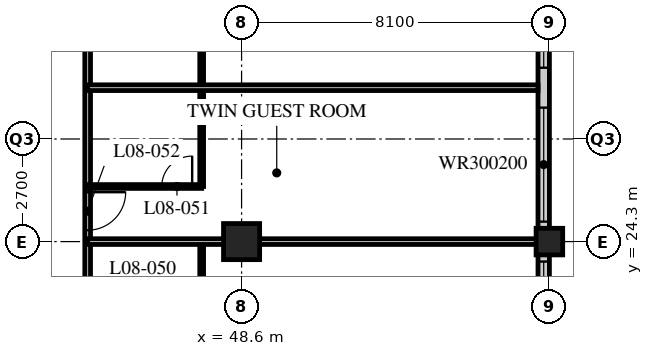
"""IFC4 building model, lengths in metres.
Left out: names, types, materials, properties, quantities, classifications, styles, units other than length and angle.
Written with IfcOpenShell. Run it as: python <this file> out.ifc"""

import sys

from ifc_helpers import new_model, si_unit, direction, frame, frame_2d, origin, origin_2d, place, context, subcontext, project, spatial, rectangle, hollow_rectangle, extrude, element, fill, save


model = new_model("IFC4")
c1 = context("Model", 3, precision=1e-05, world=origin(), true_north=direction((0.0, 1.0)))
c2 = subcontext(c1, "Body", "Model", "MODEL_VIEW")
j1 = project(units=[si_unit("LENGTHUNIT", "METRE"), si_unit("PLANEANGLEUNIT", "RADIAN")], contexts=[c1])
p1 = place(None, origin())
s1 = spatial("IfcSite", under=j1, at=p1, CompositionType="ELEMENT")
p2 = place(p1, origin())
s2 = spatial("IfcBuilding", under=s1, at=p2, CompositionType="ELEMENT")
p3 = place(p2, frame((0.0, 0.0, 39.8)))
s3 = spatial("IfcBuildingStorey", under=s2, at=p3, CompositionType="ELEMENT", Elevation=39.8)
p4 = place(p3, frame((48.6, 24.3, 0.0), z_axis=(0.0, 0.0, 1.0), x_axis=(1.0, 0.0, 0.0)))
e1 = element("IfcColumn", 1, at=p4, inside=s3, PredefinedType="COLUMN", context=c2, shape_type="SweptSolid", body=[
    extrude(hollow_rectangle(XDim=0.95, YDim=0.95, WallThickness=0.095, at=origin_2d()), origin(), (0.0, 0.0, 1.0), 3.4),
])
p5 = place(p3, frame((56.7, 24.3, 0.0), z_axis=(0.0, 0.0, 1.0), x_axis=(1.0, 0.0, 0.0)))
e2 = element("IfcColumn", 2, at=p5, inside=s3, PredefinedType="COLUMN", context=c2, shape_type="SweptSolid", body=[
    extrude(hollow_rectangle(XDim=0.7, YDim=0.7, WallThickness=0.06, at=origin_2d()), origin(), (0.0, 0.0, 1.0), 3.4),
])
p6 = place(p3, frame((56.55, 8.4, 0.0), z_axis=(0.0, 0.0, 1.0), x_axis=(0.0, 1.0, 0.0)))
e3 = element("IfcWall", 3, at=p6, inside=s3, PredefinedType="SOLIDWALL", context=c2, shape_type="SweptSolid", body=[
    extrude(rectangle(XDim=32.1, YDim=0.3, at=frame_2d((16.05, 0.0))), origin(), (0.0, 0.0, 1.0), 3.19),
])
p7 = place(p6, frame((0.225, 0.0, 0.9)))
e4 = element("IfcOpeningElement", 4, at=p7, cuts=e3, PredefinedType="OPENING", context=c2, shape_type="SweptSolid", body=[
    extrude(rectangle(XDim=3.0, YDim=2.0, at=frame_2d((1.5, 1.0))), frame((0.0, 0.16, 0.0), z_axis=(0.0, -1.0, 0.0), x_axis=(1.0, 0.0, 0.0)), (0.0, 0.0, 1.0), 0.32),
])
p8 = place(p6, frame((4.275, 0.0, 0.9)))
e5 = element("IfcOpeningElement", 5, at=p8, cuts=e3, PredefinedType="OPENING", context=c2, shape_type="SweptSolid", body=[
    extrude(rectangle(XDim=3.0, YDim=2.0, at=frame_2d((1.5, 1.0))), frame((0.0, 0.16, 0.0), z_axis=(0.0, -1.0, 0.0), x_axis=(1.0, 0.0, 0.0)), (0.0, 0.0, 1.0), 0.32),
])
p9 = place(p6, frame((8.325, 0.0, 0.9)))
e6 = element("IfcOpeningElement", 6, at=p9, cuts=e3, PredefinedType="OPENING", context=c2, shape_type="SweptSolid", body=[
    extrude(rectangle(XDim=3.0, YDim=2.0, at=frame_2d((1.5, 1.0))), frame((0.0, 0.16, 0.0), z_axis=(0.0, -1.0, 0.0), x_axis=(1.0, 0.0, 0.0)), (0.0, 0.0, 1.0), 0.32),
])
p10 = place(p6, frame((12.375, 0.0, 0.9)))
e7 = element("IfcOpeningElement", 7, at=p10, cuts=e3, PredefinedType="OPENING", context=c2, shape_type="SweptSolid", body=[
    extrude(rectangle(XDim=3.0, YDim=2.0, at=frame_2d((1.5, 1.0))), frame((0.0, 0.16, 0.0), z_axis=(0.0, -1.0, 0.0), x_axis=(1.0, 0.0, 0.0)), (0.0, 0.0, 1.0), 0.32),
])
p11 = place(p6, frame((16.425, 0.0, 0.9)))
e8 = element("IfcOpeningElement", 8, at=p11, cuts=e3, PredefinedType="OPENING", context=c2, shape_type="SweptSolid", body=[
    extrude(rectangle(XDim=3.0, YDim=2.0, at=frame_2d((1.5, 1.0))), frame((0.0, 0.16, 0.0), z_axis=(0.0, -1.0, 0.0), x_axis=(1.0, 0.0, 0.0)), (0.0, 0.0, 1.0), 0.32),
])
p12 = place(p6, frame((20.475, 0.0, 0.9)))
e9 = element("IfcOpeningElement", 9, at=p12, cuts=e3, PredefinedType="OPENING", context=c2, shape_type="SweptSolid", body=[
    extrude(rectangle(XDim=3.0, YDim=2.0, at=frame_2d((1.5, 1.0))), frame((0.0, 0.16, 0.0), z_axis=(0.0, -1.0, 0.0), x_axis=(1.0, 0.0, 0.0)), (0.0, 0.0, 1.0), 0.32),
])
p13 = place(p6, frame((24.525, 0.0, 0.9)))
e10 = element("IfcOpeningElement", 10, at=p13, cuts=e3, PredefinedType="OPENING", context=c2, shape_type="SweptSolid", body=[
    extrude(rectangle(XDim=3.0, YDim=2.0, at=frame_2d((1.5, 1.0))), frame((0.0, 0.16, 0.0), z_axis=(0.0, -1.0, 0.0), x_axis=(1.0, 0.0, 0.0)), (0.0, 0.0, 1.0), 0.32),
])
p14 = place(p6, frame((28.575, 0.0, 0.9)))
e11 = element("IfcOpeningElement", 11, at=p14, cuts=e3, PredefinedType="OPENING", context=c2, shape_type="SweptSolid", body=[
    extrude(rectangle(XDim=3.0, YDim=2.0, at=frame_2d((1.5, 1.0))), frame((0.0, 0.16, 0.0), z_axis=(0.0, -1.0, 0.0), x_axis=(1.0, 0.0, 0.0)), (0.0, 0.0, 1.0), 0.32),
])
p15 = place(p3, frame((44.55, 16.2, 0.0), z_axis=(0.0, 0.0, 1.0), x_axis=(0.0, 1.0, 0.0)))
e12 = element("IfcWall", 12, at=p15, inside=s3, PredefinedType="PARTITIONING", context=c2, shape_type="SweptSolid", body=[
    extrude(rectangle(XDim=26.1, YDim=0.15, at=frame_2d((13.05, 0.0))), origin(), (0.0, 0.0, 1.0), 3.19),
])
p16 = place(p15, frame((2.75, 0.0, 0.0)))
e13 = element("IfcOpeningElement", 13, at=p16, cuts=e12, PredefinedType="OPENING", context=c2, shape_type="SweptSolid", body=[
    extrude(rectangle(XDim=1.0, YDim=2.1, at=frame_2d((0.5, 1.05))), frame((0.0, 0.085, 0.0), z_axis=(0.0, -1.0, 0.0), x_axis=(1.0, 0.0, 0.0)), (0.0, 0.0, 1.0), 0.17),
])
p17 = place(p15, frame((4.35, 0.0, 0.0)))
e14 = element("IfcOpeningElement", 14, at=p17, cuts=e12, PredefinedType="OPENING", context=c2, shape_type="SweptSolid", body=[
    extrude(rectangle(XDim=1.0, YDim=2.1, at=frame_2d((0.5, 1.05))), frame((0.0, 0.085, 0.0), z_axis=(0.0, -1.0, 0.0), x_axis=(1.0, 0.0, 0.0)), (0.0, 0.0, 1.0), 0.17),
])
p18 = place(p15, frame((8.4, 0.0, 0.0)))
e15 = element("IfcOpeningElement", 15, at=p18, cuts=e12, PredefinedType="OPENING", context=c2, shape_type="SweptSolid", body=[
    extrude(rectangle(XDim=1.0, YDim=2.1, at=frame_2d((0.5, 1.05))), frame((0.0, 0.085, 0.0), z_axis=(0.0, -1.0, 0.0), x_axis=(1.0, 0.0, 0.0)), (0.0, 0.0, 1.0), 0.17),
])
p19 = place(p15, frame((14.6, 0.0, 0.0)))
e16 = element("IfcOpeningElement", 16, at=p19, cuts=e12, PredefinedType="OPENING", context=c2, shape_type="SweptSolid", body=[
    extrude(rectangle(XDim=1.0, YDim=2.1, at=frame_2d((0.5, 1.05))), frame((0.0, 0.085, 0.0), z_axis=(0.0, -1.0, 0.0), x_axis=(1.0, 0.0, 0.0)), (0.0, 0.0, 1.0), 0.17),
])
p20 = place(p15, frame((18.65, 0.0, 0.0)))
e17 = element("IfcOpeningElement", 17, at=p20, cuts=e12, PredefinedType="OPENING", context=c2, shape_type="SweptSolid", body=[
    extrude(rectangle(XDim=1.0, YDim=2.1, at=frame_2d((0.5, 1.05))), frame((0.0, 0.085, 0.0), z_axis=(0.0, -1.0, 0.0), x_axis=(1.0, 0.0, 0.0)), (0.0, 0.0, 1.0), 0.17),
])
p21 = place(p15, frame((22.65, 0.0, 0.0)))
e18 = element("IfcOpeningElement", 18, at=p21, cuts=e12, PredefinedType="OPENING", context=c2, shape_type="SweptSolid", body=[
    extrude(rectangle(XDim=1.0, YDim=2.1, at=frame_2d((0.5, 1.05))), frame((0.0, 0.085, 0.0), z_axis=(0.0, -1.0, 0.0), x_axis=(1.0, 0.0, 0.0)), (0.0, 0.0, 1.0), 0.17),
])
p22 = place(p3, frame((47.55, 21.7, 0.0), z_axis=(0.0, 0.0, 1.0), x_axis=(0.0, 1.0, 0.0)))
e19 = element("IfcWall", 19, at=p22, inside=s3, PredefinedType="PARTITIONING", context=c2, shape_type="SweptSolid", body=[
    extrude(rectangle(XDim=2.6, YDim=0.1, at=frame_2d((1.3, 0.0))), origin(), (0.0, 0.0, 1.0), 3.19),
])
p23 = place(p3, frame((44.55, 24.3, 0.0), z_axis=(0.0, 0.0, 1.0), x_axis=(1.0, 0.0, 0.0)))
e20 = element("IfcWall", 20, at=p23, inside=s3, PredefinedType="PARTITIONING", context=c2, shape_type="SweptSolid", body=[
    extrude(rectangle(XDim=11.85, YDim=0.15, at=frame_2d((5.925, 0.0))), origin(), (0.0, 0.0, 1.0), 2.578),
])
p24 = place(p3, frame((47.55, 25.75, 0.0), z_axis=(0.0, 0.0, 1.0), x_axis=(0.0, 1.0, 0.0)))
e21 = element("IfcWall", 21, at=p24, inside=s3, PredefinedType="PARTITIONING", context=c2, shape_type="SweptSolid", body=[
    extrude(rectangle(XDim=4.9, YDim=0.1, at=frame_2d((2.45, 0.0))), origin(), (0.0, 0.0, 1.0), 3.19),
])
p25 = place(p3, frame((44.55, 25.75, 0.0), z_axis=(0.0, 0.0, 1.0), x_axis=(1.0, 0.0, 0.0)))
e22 = element("IfcWall", 22, at=p25, inside=s3, PredefinedType="PARTITIONING", context=c2, shape_type="SweptSolid", body=[
    extrude(rectangle(XDim=3.0, YDim=0.1, at=frame_2d((1.5, 0.0))), origin(), (0.0, 0.0, 1.0), 3.19),
])
p26 = place(p25, frame((1.95, 0.0, 0.0)))
e23 = element("IfcOpeningElement", 23, at=p26, cuts=e22, PredefinedType="OPENING", context=c2, shape_type="SweptSolid", body=[
    extrude(rectangle(XDim=0.8, YDim=2.1, at=frame_2d((0.4, 1.05))), frame((0.0, 0.06, 0.0), z_axis=(0.0, -1.0, 0.0), x_axis=(1.0, 0.0, 0.0)), (0.0, 0.0, 1.0), 0.12),
])
p27 = place(p3, frame((44.55, 28.35, 0.0), z_axis=(0.0, 0.0, 1.0), x_axis=(1.0, 0.0, 0.0)))
e24 = element("IfcWall", 24, at=p27, inside=s3, PredefinedType="PARTITIONING", context=c2, shape_type="SweptSolid", body=[
    extrude(rectangle(XDim=11.85, YDim=0.15, at=frame_2d((5.925, 0.0))), origin(), (0.0, 0.0, 1.0), 3.19),
])
p28 = place(p10, origin())
e25 = element("IfcWindow", 25, at=p28, inside=s3, PartitioningType="SINGLE_PANEL", PredefinedType="WINDOW", context=c2, shape_type="SweptSolid", body=[
    extrude(rectangle(XDim=3.0, YDim=2.0, at=frame_2d((1.5, 1.0))), frame((0.0, 0.03, 0.0), z_axis=(0.0, -1.0, 0.0), x_axis=(1.0, 0.0, 0.0)), (0.0, 0.0, 1.0), 0.06),
])
fill(e7, e25)
p29 = place(p11, origin())
e26 = element("IfcWindow", 26, at=p29, inside=s3, PartitioningType="SINGLE_PANEL", PredefinedType="WINDOW", context=c2, shape_type="SweptSolid", body=[
    extrude(rectangle(XDim=3.0, YDim=2.0, at=frame_2d((1.5, 1.0))), frame((0.0, 0.03, 0.0), z_axis=(0.0, -1.0, 0.0), x_axis=(1.0, 0.0, 0.0)), (0.0, 0.0, 1.0), 0.06),
])
fill(e8, e26)
p30 = place(p12, origin())
e27 = element("IfcWindow", 27, at=p30, inside=s3, PartitioningType="SINGLE_PANEL", PredefinedType="WINDOW", context=c2, shape_type="SweptSolid", body=[
    extrude(rectangle(XDim=3.0, YDim=2.0, at=frame_2d((1.5, 1.0))), frame((0.0, 0.03, 0.0), z_axis=(0.0, -1.0, 0.0), x_axis=(1.0, 0.0, 0.0)), (0.0, 0.0, 1.0), 0.06),
])
fill(e9, e27)
p31 = place(p26, origin())
e28 = element("IfcDoor", 28, at=p31, inside=s3, OperationType="SINGLE_SWING_RIGHT", PredefinedType="DOOR", context=c2, shape_type="SweptSolid", body=[
    extrude(rectangle(XDim=0.8, YDim=2.1, at=frame_2d((0.4, 1.05))), frame((0.0, 0.025, 0.0), z_axis=(0.0, -1.0, 0.0), x_axis=(1.0, 0.0, 0.0)), (0.0, 0.0, 1.0), 0.05),
])
fill(e23, e28)
p32 = place(p18, origin())
e29 = element("IfcDoor", 29, at=p32, inside=s3, OperationType="SINGLE_SWING_LEFT", PredefinedType="DOOR", context=c2, shape_type="SweptSolid", body=[
    extrude(rectangle(XDim=1.0, YDim=2.1, at=frame_2d((0.5, 1.05))), frame((0.0, 0.025, 0.0), z_axis=(0.0, -1.0, 0.0), x_axis=(1.0, 0.0, 0.0)), (0.0, 0.0, 1.0), 0.05),
])
fill(e15, e29)
save(model, sys.argv[1])
